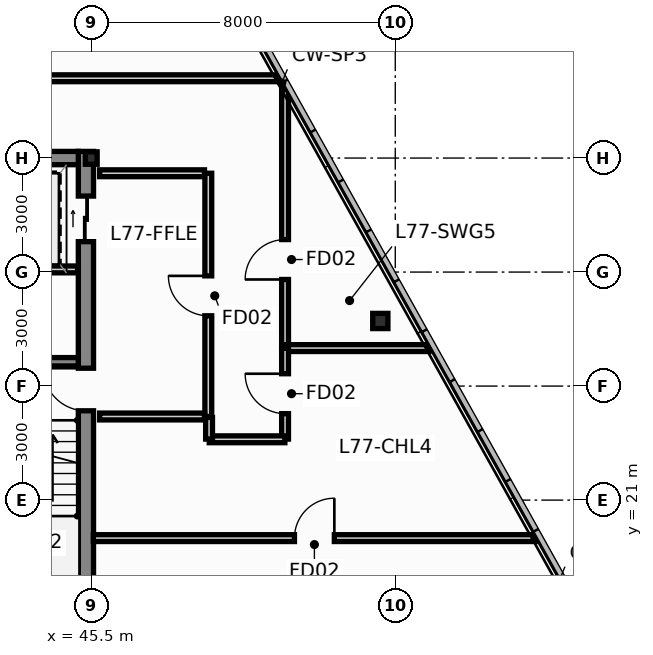
"""IFC4 building model, lengths in metres.
Left out: names, types, materials, properties, quantities, classifications, styles, units other than length and angle.
Written with IfcOpenShell. Run it as: python <this file> out.ifc"""

import sys

from ifc_helpers import new_model, si_unit, direction, frame, frame_2d, origin, origin_2d, place, context, subcontext, project, spatial, rectangle, hollow_rectangle, i_section, extrude, source, transform, mapped, element, fill, save


model = new_model("IFC4")
c1 = context("Model", 3, precision=1e-05, world=origin(), true_north=direction((0.0, 1.0)))
c2 = subcontext(c1, "Body", "Model", "MODEL_VIEW")
j1 = project(units=[si_unit("LENGTHUNIT", "METRE"), si_unit("PLANEANGLEUNIT", "RADIAN")], contexts=[c1])
p1 = place(None, origin())
s1 = spatial("IfcSite", under=j1, at=p1, CompositionType="ELEMENT")
p2 = place(p1, origin())
s2 = spatial("IfcBuilding", under=s1, at=p2, CompositionType="ELEMENT")
p3 = place(p2, frame((0.0, 0.0, 293.2)))
s3 = spatial("IfcBuildingStorey", under=s2, at=p3, CompositionType="ELEMENT", Elevation=293.2)
m1 = source(origin(), c2, "Body", "SweptSolid", [
    extrude(i_section(OverallWidth=0.311, OverallDepth=0.327, WebThickness=0.016, FlangeThickness=0.025, at=origin_2d()), origin(), (0.0, 0.0, 1.0), 3.4),
])
p4 = place(p3, frame((45.5, 30.0, 0.0), z_axis=(0.0, 0.0, 1.0), x_axis=(1.0, 0.0, 0.0)))
e1 = element("IfcColumn", 1, at=p4, inside=s3, PredefinedType="COLUMN", context=c2, shape_type="MappedRepresentation", body=[
    mapped(m1, transform((0.0, 0.0, 0.0), scale=1.0)),
])
p5 = place(p3, frame((45.36, 17.05, 0.0), z_axis=(0.0, 0.0, 1.0), x_axis=(0.0, 1.0, 0.0)))
e2 = element("IfcWall", 2, at=p5, inside=s3, PredefinedType="SHEAR", context=c2, shape_type="SweptSolid", body=[
    extrude(rectangle(XDim=13.125, YDim=0.4, at=frame_2d((6.562, 0.0))), origin(), (0.0, 0.0, 1.0), 3.4),
])
p6 = place(p5, frame((6.3, 0.0, 0.0)))
e3 = element("IfcOpeningElement", 3, at=p6, cuts=e2, PredefinedType="OPENING", context=c2, shape_type="SweptSolid", body=[
    extrude(rectangle(XDim=1.12, YDim=2.15, at=frame_2d((0.56, 1.075))), frame((0.0, 0.212, 0.0), z_axis=(0.0, -1.0, 0.0), x_axis=(1.0, 0.0, 0.0)), (0.0, 0.0, 1.0), 0.424),
])
p7 = place(p5, frame((10.75, 0.0, 0.0)))
e4 = element("IfcOpeningElement", 4, at=p7, cuts=e2, PredefinedType="OPENING", context=c2, shape_type="SweptSolid", body=[
    extrude(rectangle(XDim=1.2, YDim=2.2, at=frame_2d((0.6, 1.1))), frame((0.0, 0.212, 0.0), z_axis=(0.0, -1.0, 0.0), x_axis=(1.0, 0.0, 0.0)), (0.0, 0.0, 1.0), 0.424),
])
p8 = place(p3, frame((42.26, 30.0, 0.0), z_axis=(0.0, 0.0, 1.0), x_axis=(1.0, 0.0, 0.0)))
e5 = element("IfcWall", 5, at=p8, inside=s3, PredefinedType="SHEAR", context=c2, shape_type="SweptSolid", body=[
    extrude(rectangle(XDim=2.9, YDim=0.35, at=frame_2d((1.45, 0.0))), origin(), (0.0, 0.0, 1.0), 3.4),
])
p9 = place(p3, frame((42.26, 24.64, 0.0), z_axis=(0.0, 0.0, 1.0), x_axis=(1.0, 0.0, 0.0)))
e6 = element("IfcWall", 6, at=p9, inside=s3, PredefinedType="SHEAR", context=c2, shape_type="SweptSolid", body=[
    extrude(rectangle(XDim=2.9, YDim=0.22, at=frame_2d((1.45, 0.0))), origin(), (0.0, 0.0, 1.0), 3.4),
])
m2 = source(origin(), c2, "Body", "SweptSolid", [
    extrude(hollow_rectangle(XDim=0.4, YDim=0.4, WallThickness=0.016, at=origin_2d()), origin(), (0.0, 0.0, 1.0), 3.401),
])
p10 = place(p3, frame((53.107, 25.713, 0.0), z_axis=(-0.014931934338, -0.013783324004, 0.999793507339), x_axis=(0.678280102733, -0.734803444627, 0.0)))
e7 = element("IfcColumn", 7, at=p10, inside=s3, PredefinedType="COLUMN", context=c2, shape_type="MappedRepresentation", body=[
    mapped(m2, transform((0.0, 0.0, 0.0), scale=1.0)),
])
p11 = place(p3, frame((48.58, 23.2, 0.0), z_axis=(0.0, 0.0, 1.0), x_axis=(0.0, 1.0, 0.0)))
e8 = element("IfcWall", 8, at=p11, inside=s3, PredefinedType="PARTITIONING", context=c2, shape_type="SweptSolid", body=[
    extrude(rectangle(XDim=6.4, YDim=0.18, at=frame_2d((3.2, 0.0))), origin(), (0.0, 0.0, 1.0), 2.835),
])
p12 = place(p11, frame((2.65, 0.0, 0.0)))
e9 = element("IfcOpeningElement", 9, at=p12, cuts=e8, PredefinedType="OPENING", context=c2, shape_type="SweptSolid", body=[
    extrude(rectangle(XDim=1.05, YDim=2.15, at=frame_2d((0.525, 1.075))), frame((0.0, 0.102, 0.0), z_axis=(0.0, -1.0, 0.0), x_axis=(1.0, 0.0, 0.0)), (0.0, 0.0, 1.0), 0.204),
])
for number, where, z_axis, x_axis in (
    (10, (45.72, 23.2, 0.0), (0.0, 0.0, 1.0), (1.0, 0.0, 0.0)),
    (11, (45.72, 29.6, 0.0), (0.0, 0.0, 1.0), (1.0, 0.0, 0.0)),
):
    element("IfcWall", number, at=place(p3, frame(where, z_axis=z_axis, x_axis=x_axis)), inside=s3, PredefinedType="PARTITIONING", context=c2, shape_type="SweptSolid", body=[
        extrude(rectangle(XDim=2.76, YDim=0.18, at=frame_2d((1.38, 0.0))), origin(), (0.0, 0.0, 1.0), 3.15),
    ])
p13 = place(p3, frame((42.24, 27.07, 0.0), z_axis=(0.0, 0.0, 1.0), x_axis=(1.0, 0.0, 0.0)))
e12 = element("IfcWall", 12, at=p13, inside=s3, PredefinedType="PARTITIONING", context=c2, shape_type="SweptSolid", body=[
    extrude(rectangle(XDim=2.9, YDim=0.18, at=frame_2d((1.45, 0.0))), origin(), (0.0, 0.0, 1.0), 3.15),
])
p14 = place(p3, frame((45.555, 20.0, 0.0), z_axis=(0.0, 0.0, 1.0), x_axis=(1.0, 0.0, 0.0)))
e13 = element("IfcWall", 13, at=p14, inside=s3, PredefinedType="PARTITIONING", context=c2, shape_type="SweptSolid", body=[
    extrude(rectangle(XDim=11.635, YDim=0.18, at=frame_2d((5.817, 0.0))), origin(), (0.0, 0.0, 1.0), 3.15),
])
p15 = place(p14, frame((5.292, 0.0, 0.0)))
e14 = element("IfcOpeningElement", 14, at=p15, cuts=e13, PredefinedType="OPENING", context=c2, shape_type="SweptSolid", body=[
    extrude(rectangle(XDim=1.05, YDim=2.15, at=frame_2d((0.525, 1.075))), frame((0.0, 0.102, 0.0), z_axis=(0.0, -1.0, 0.0), x_axis=(1.0, 0.0, 0.0)), (0.0, 0.0, 1.0), 0.204),
])
p16 = place(p3, frame((41.505, 32.1, 0.0), z_axis=(0.0, 0.0, 1.0), x_axis=(1.0, 0.0, 0.0)))
e15 = element("IfcWall", 15, at=p16, inside=s3, PredefinedType="PARTITIONING", context=c2, shape_type="SweptSolid", body=[
    extrude(rectangle(XDim=8.925, YDim=0.18, at=frame_2d((4.462, 0.0))), origin(), (0.0, 0.0, 1.0), 2.835),
])
p17 = place(p3, frame((50.6, 25.005, 0.0), z_axis=(0.0, 0.0, 1.0), x_axis=(0.0, 1.0, 0.0)))
e16 = element("IfcWall", 16, at=p17, inside=s3, PredefinedType="PARTITIONING", context=c2, shape_type="SweptSolid", body=[
    extrude(rectangle(XDim=6.795, YDim=0.18, at=frame_2d((3.397, 0.0))), origin(), (0.0, 0.0, 1.0), 2.835),
])
p18 = place(p17, frame((1.8, 0.0, 0.0)))
e17 = element("IfcOpeningElement", 17, at=p18, cuts=e16, PredefinedType="OPENING", context=c2, shape_type="SweptSolid", body=[
    extrude(rectangle(XDim=1.05, YDim=2.15, at=frame_2d((0.525, 1.075))), frame((0.0, 0.102, 0.0), z_axis=(0.0, -1.0, 0.0), x_axis=(1.0, 0.0, 0.0)), (0.0, 0.0, 1.0), 0.204),
])
p19 = place(p3, frame((50.605, 25.0, 0.0), z_axis=(0.0, 0.0, 1.0), x_axis=(1.0, 0.0, 0.0)))
e18 = element("IfcWall", 18, at=p19, inside=s3, PredefinedType="PARTITIONING", context=c2, shape_type="SweptSolid", body=[
    extrude(rectangle(XDim=3.785, YDim=0.18, at=frame_2d((1.893, 0.0))), origin(), (0.0, 0.0, 1.0), 3.15),
])
p20 = place(p3, frame((50.6, 22.605, 0.0), z_axis=(0.0, 0.0, 1.0), x_axis=(0.0, 1.0, 0.0)))
e19 = element("IfcWall", 19, at=p20, inside=s3, PredefinedType="PARTITIONING", context=c2, shape_type="SweptSolid", body=[
    extrude(rectangle(XDim=2.39, YDim=0.18, at=frame_2d((1.195, 0.0))), origin(), (0.0, 0.0, 1.0), 2.835),
])
p21 = place(p20, frame((0.67, 0.0, 0.0)))
e20 = element("IfcOpeningElement", 20, at=p21, cuts=e19, PredefinedType="OPENING", context=c2, shape_type="SweptSolid", body=[
    extrude(rectangle(XDim=1.05, YDim=2.15, at=frame_2d((0.525, 1.075))), frame((0.0, 0.102, 0.0), z_axis=(0.0, -1.0, 0.0), x_axis=(1.0, 0.0, 0.0)), (0.0, 0.0, 1.0), 0.204),
])
p22 = place(p3, frame((48.605, 22.6, 0.0), z_axis=(0.0, 0.0, 1.0), x_axis=(1.0, 0.0, 0.0)))
e21 = element("IfcWall", 21, at=p22, inside=s3, PredefinedType="PARTITIONING", context=c2, shape_type="SweptSolid", body=[
    extrude(rectangle(XDim=1.99, YDim=0.18, at=frame_2d((0.995, 0.0))), origin(), (0.0, 0.0, 1.0), 3.15),
])
p23 = place(p3, frame((48.6, 23.175, 0.0), z_axis=(0.0, 0.0, 1.0), x_axis=(0.0, -1.0, 0.0)))
e22 = element("IfcWall", 22, at=p23, inside=s3, PredefinedType="PARTITIONING", context=c2, shape_type="SweptSolid", body=[
    extrude(rectangle(XDim=0.57, YDim=0.18, at=frame_2d((0.285, 0.0))), origin(), (0.0, 0.0, 1.0), 2.835),
])
p24 = place(p6, origin())
e23 = element("IfcDoor", 23, at=p24, inside=s3, OperationType="SINGLE_SWING_RIGHT", PredefinedType="DOOR", context=c2, shape_type="SweptSolid", body=[
    extrude(rectangle(XDim=1.12, YDim=2.15, at=frame_2d((0.56, 1.075))), frame((0.0, 0.025, 0.0), z_axis=(0.0, -1.0, 0.0), x_axis=(1.0, 0.0, 0.0)), (0.0, 0.0, 1.0), 0.05),
])
fill(e3, e23)
p25 = place(p7, origin())
e24 = element("IfcDoor", 24, at=p25, inside=s3, OperationType="SLIDING_TO_RIGHT", PredefinedType="DOOR", context=c2, shape_type="SweptSolid", body=[
    extrude(rectangle(XDim=1.2, YDim=2.2, at=frame_2d((0.6, 1.1))), frame((0.0, 0.025, 0.0), z_axis=(0.0, -1.0, 0.0), x_axis=(1.0, 0.0, 0.0)), (0.0, 0.0, 1.0), 0.05),
])
fill(e4, e24)
p26 = place(p12, origin())
e25 = element("IfcDoor", 25, at=p26, inside=s3, OperationType="SINGLE_SWING_RIGHT", PredefinedType="DOOR", context=c2, shape_type="SweptSolid", body=[
    extrude(rectangle(XDim=1.05, YDim=2.15, at=frame_2d((0.525, 1.075))), frame((0.0, 0.025, 0.0), z_axis=(0.0, -1.0, 0.0), x_axis=(1.0, 0.0, 0.0)), (0.0, 0.0, 1.0), 0.05),
])
fill(e9, e25)
p27 = place(p15, origin())
e26 = element("IfcDoor", 26, at=p27, inside=s3, OperationType="SINGLE_SWING_RIGHT", PredefinedType="DOOR", context=c2, shape_type="SweptSolid", body=[
    extrude(rectangle(XDim=1.05, YDim=2.15, at=frame_2d((0.525, 1.075))), frame((0.0, 0.025, 0.0), z_axis=(0.0, -1.0, 0.0), x_axis=(1.0, 0.0, 0.0)), (0.0, 0.0, 1.0), 0.05),
])
fill(e14, e26)
p28 = place(p18, origin())
e27 = element("IfcDoor", 27, at=p28, inside=s3, OperationType="SINGLE_SWING_LEFT", PredefinedType="DOOR", context=c2, shape_type="SweptSolid", body=[
    extrude(rectangle(XDim=1.05, YDim=2.15, at=frame_2d((0.525, 1.075))), frame((0.0, 0.025, 0.0), z_axis=(0.0, -1.0, 0.0), x_axis=(1.0, 0.0, 0.0)), (0.0, 0.0, 1.0), 0.05),
])
fill(e17, e27)
p29 = place(p21, origin())
e28 = element("IfcDoor", 28, at=p29, inside=s3, OperationType="SINGLE_SWING_RIGHT", PredefinedType="DOOR", context=c2, shape_type="SweptSolid", body=[
    extrude(rectangle(XDim=1.05, YDim=2.15, at=frame_2d((0.525, 1.075))), frame((0.0, 0.025, 0.0), z_axis=(0.0, -1.0, 0.0), x_axis=(1.0, 0.0, 0.0)), (0.0, 0.0, 1.0), 0.05),
])
fill(e20, e28)
save(model, sys.argv[1])
